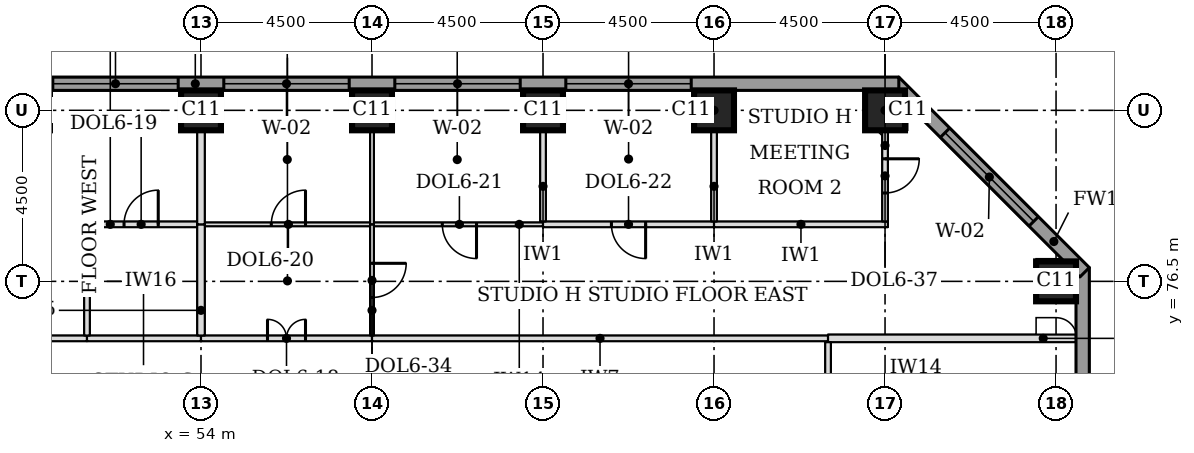
"""IFC4 building model, lengths in metres.
Left out: names, types, materials, properties, quantities, classifications, styles, units other than length and angle.
Written with IfcOpenShell. Run it as: python <this file> out.ifc"""

import sys

from ifc_helpers import new_model, si_unit, direction, frame, frame_2d, origin, origin_2d, place, context, subcontext, project, spatial, rectangle, extrude, element, fill, save


model = new_model("IFC4")
c1 = context("Model", 3, precision=1e-05, world=origin(), true_north=direction((0.0, 1.0)))
c2 = subcontext(c1, "Body", "Model", "MODEL_VIEW")
j1 = project(units=[si_unit("LENGTHUNIT", "METRE"), si_unit("PLANEANGLEUNIT", "RADIAN")], contexts=[c1])
p1 = place(None, origin())
s1 = spatial("IfcSite", under=j1, at=p1, CompositionType="ELEMENT")
p2 = place(p1, origin())
s2 = spatial("IfcBuilding", under=s1, at=p2, CompositionType="ELEMENT")
p3 = place(p2, frame((0.0, 0.0, 115.9)))
s3 = spatial("IfcBuildingStorey", under=s2, at=p3, CompositionType="ELEMENT", Elevation=115.9)
for number, where, z_axis, x_axis in (
    (1, (76.5, 76.5, 0.0), (0.0, 0.0, 1.0), (1.0, 0.0, 0.0)),
    (2, (54.0, 81.0, 0.0), (0.0, 0.0, 1.0), (1.0, 0.0, 0.0)),
    (3, (58.5, 81.0, 0.0), (0.0, 0.0, 1.0), (1.0, 0.0, 0.0)),
    (4, (63.0, 81.0, 0.0), (0.0, 0.0, 1.0), (1.0, 0.0, 0.0)),
    (5, (67.5, 81.0, 0.0), (0.0, 0.0, 1.0), (1.0, 0.0, 0.0)),
    (6, (72.0, 81.0, 0.0), (0.0, 0.0, 1.0), (1.0, 0.0, 0.0)),
):
    element("IfcColumn", number, at=place(p3, frame(where, z_axis=z_axis, x_axis=x_axis)), inside=s3, PredefinedType="COLUMN", context=c2, shape_type="SweptSolid", body=[
        extrude(rectangle(XDim=1.05, YDim=1.05, at=origin_2d()), origin(), (0.0, 0.0, 1.0), 3.7),
    ])
p4 = place(p3, frame((77.2, 44.638, 0.0), z_axis=(0.0, 0.0, 1.0), x_axis=(0.0, 1.0, 0.0)))
e7 = element("IfcWall", 7, at=p4, inside=s3, PredefinedType="STANDARD", context=c2, shape_type="SweptSolid", body=[
    extrude(rectangle(XDim=32.225, YDim=0.35, at=frame_2d((16.112, 0.0))), origin(), (0.0, 0.0, 1.0), 3.525),
])
p5 = place(p4, frame((5.462, 0.0, 0.9)))
e8 = element("IfcOpeningElement", 8, at=p5, cuts=e7, PredefinedType="OPENING", context=c2, shape_type="SweptSolid", body=[
    extrude(rectangle(XDim=3.3, YDim=1.9, at=frame_2d((1.65, 0.95))), frame((0.0, 0.185, 0.0), z_axis=(0.0, -1.0, 0.0), x_axis=(1.0, 0.0, 0.0)), (0.0, 0.0, 1.0), 0.37),
])
p6 = place(p4, frame((9.962, 0.0, 0.9)))
e9 = element("IfcOpeningElement", 9, at=p6, cuts=e7, PredefinedType="OPENING", context=c2, shape_type="SweptSolid", body=[
    extrude(rectangle(XDim=3.3, YDim=1.9, at=frame_2d((1.65, 0.95))), frame((0.0, 0.185, 0.0), z_axis=(0.0, -1.0, 0.0), x_axis=(1.0, 0.0, 0.0)), (0.0, 0.0, 1.0), 0.37),
])
p7 = place(p4, frame((14.462, 0.0, 0.9)))
e10 = element("IfcOpeningElement", 10, at=p7, cuts=e7, PredefinedType="OPENING", context=c2, shape_type="SweptSolid", body=[
    extrude(rectangle(XDim=3.3, YDim=1.9, at=frame_2d((1.65, 0.95))), frame((0.0, 0.185, 0.0), z_axis=(0.0, -1.0, 0.0), x_axis=(1.0, 0.0, 0.0)), (0.0, 0.0, 1.0), 0.37),
])
p8 = place(p4, frame((18.962, 0.0, 0.9)))
e11 = element("IfcOpeningElement", 11, at=p8, cuts=e7, PredefinedType="OPENING", context=c2, shape_type="SweptSolid", body=[
    extrude(rectangle(XDim=3.3, YDim=1.9, at=frame_2d((1.65, 0.95))), frame((0.0, 0.185, 0.0), z_axis=(0.0, -1.0, 0.0), x_axis=(1.0, 0.0, 0.0)), (0.0, 0.0, 1.0), 0.37),
])
p9 = place(p4, frame((23.462, 0.0, 0.9)))
e12 = element("IfcOpeningElement", 12, at=p9, cuts=e7, PredefinedType="OPENING", context=c2, shape_type="SweptSolid", body=[
    extrude(rectangle(XDim=3.3, YDim=1.9, at=frame_2d((1.65, 0.95))), frame((0.0, 0.185, 0.0), z_axis=(0.0, -1.0, 0.0), x_axis=(1.0, 0.0, 0.0)), (0.0, 0.0, 1.0), 0.37),
])
p10 = place(p3, frame((77.251, 76.739, 0.0), z_axis=(0.0, 0.0, 1.0), x_axis=(-0.707106781187, 0.707106781187, 0.0)))
e13 = element("IfcWall", 13, at=p10, inside=s3, PredefinedType="STANDARD", context=c2, shape_type="SweptSolid", body=[
    extrude(rectangle(XDim=7.089, YDim=0.35, at=frame_2d((3.544, 0.0))), origin(), (0.0, 0.0, 1.0), 3.525),
])
p11 = place(p10, frame((1.894, 0.0, 0.9)))
e14 = element("IfcOpeningElement", 14, at=p11, cuts=e13, PredefinedType="OPENING", context=c2, shape_type="SweptSolid", body=[
    extrude(rectangle(XDim=3.3, YDim=1.9, at=frame_2d((1.65, 0.95))), frame((0.0, 0.185, 0.0), z_axis=(0.0, -1.0, 0.0), x_axis=(1.0, 0.0, 0.0)), (0.0, 0.0, 1.0), 0.37),
])
p12 = place(p3, frame((72.362, 81.7, 0.0), z_axis=(0.0, 0.0, 1.0), x_axis=(-1.0, 0.0, 0.0)))
e15 = element("IfcWall", 15, at=p12, inside=s3, PredefinedType="STANDARD", context=c2, shape_type="SweptSolid", body=[
    extrude(rectangle(XDim=32.225, YDim=0.35, at=frame_2d((16.112, 0.0))), origin(), (0.0, 0.0, 1.0), 3.525),
])
p13 = place(p12, frame((5.462, 0.0, 0.9)))
e16 = element("IfcOpeningElement", 16, at=p13, cuts=e15, PredefinedType="OPENING", context=c2, shape_type="SweptSolid", body=[
    extrude(rectangle(XDim=3.3, YDim=1.9, at=frame_2d((1.65, 0.95))), frame((0.0, 0.185, 0.0), z_axis=(0.0, -1.0, 0.0), x_axis=(1.0, 0.0, 0.0)), (0.0, 0.0, 1.0), 0.37),
])
p14 = place(p12, frame((9.962, 0.0, 0.9)))
e17 = element("IfcOpeningElement", 17, at=p14, cuts=e15, PredefinedType="OPENING", context=c2, shape_type="SweptSolid", body=[
    extrude(rectangle(XDim=3.3, YDim=1.9, at=frame_2d((1.65, 0.95))), frame((0.0, 0.185, 0.0), z_axis=(0.0, -1.0, 0.0), x_axis=(1.0, 0.0, 0.0)), (0.0, 0.0, 1.0), 0.37),
])
p15 = place(p12, frame((14.462, 0.0, 0.9)))
e18 = element("IfcOpeningElement", 18, at=p15, cuts=e15, PredefinedType="OPENING", context=c2, shape_type="SweptSolid", body=[
    extrude(rectangle(XDim=3.3, YDim=1.9, at=frame_2d((1.65, 0.95))), frame((0.0, 0.185, 0.0), z_axis=(0.0, -1.0, 0.0), x_axis=(1.0, 0.0, 0.0)), (0.0, 0.0, 1.0), 0.37),
])
p16 = place(p12, frame((18.962, 0.0, 0.9)))
e19 = element("IfcOpeningElement", 19, at=p16, cuts=e15, PredefinedType="OPENING", context=c2, shape_type="SweptSolid", body=[
    extrude(rectangle(XDim=3.3, YDim=1.9, at=frame_2d((1.65, 0.95))), frame((0.0, 0.185, 0.0), z_axis=(0.0, -1.0, 0.0), x_axis=(1.0, 0.0, 0.0)), (0.0, 0.0, 1.0), 0.37),
])
p17 = place(p12, frame((23.462, 0.0, 0.9)))
e20 = element("IfcOpeningElement", 20, at=p17, cuts=e15, PredefinedType="OPENING", context=c2, shape_type="SweptSolid", body=[
    extrude(rectangle(XDim=3.3, YDim=1.9, at=frame_2d((1.65, 0.95))), frame((0.0, 0.185, 0.0), z_axis=(0.0, -1.0, 0.0), x_axis=(1.0, 0.0, 0.0)), (0.0, 0.0, 1.0), 0.37),
])
p18 = place(p3, frame((46.5, 75.0, 0.0), z_axis=(0.0, 0.0, 1.0), x_axis=(1.0, 0.0, 0.0)))
e21 = element("IfcWall", 21, at=p18, inside=s3, PredefinedType="PARTITIONING", context=c2, shape_type="SweptSolid", body=[
    extrude(rectangle(XDim=4.5, YDim=0.15, at=frame_2d((2.25, 0.0))), origin(), (0.0, 0.0, 1.0), 3.55),
])
p19 = place(p3, frame((51.0, 75.0, 0.0), z_axis=(0.0, 0.0, 1.0), x_axis=(1.0, 0.0, 0.0)))
e22 = element("IfcWall", 22, at=p19, inside=s3, PredefinedType="PARTITIONING", context=c2, shape_type="SweptSolid", body=[
    extrude(rectangle(XDim=3.0, YDim=0.15, at=frame_2d((1.5, 0.0))), origin(), (0.0, 0.0, 1.0), 3.55),
])
p20 = place(p3, frame((54.0, 75.0, 0.0), z_axis=(0.0, 0.0, 1.0), x_axis=(1.0, 0.0, 0.0)))
e23 = element("IfcWall", 23, at=p20, inside=s3, PredefinedType="PARTITIONING", context=c2, shape_type="SweptSolid", body=[
    extrude(rectangle(XDim=4.5, YDim=0.15, at=frame_2d((2.25, 0.0))), origin(), (0.0, 0.0, 1.0), 3.55),
])
p21 = place(p20, frame((1.75, 0.0, 0.0)))
e24 = element("IfcOpeningElement", 24, at=p21, cuts=e23, PredefinedType="OPENING", context=c2, shape_type="SweptSolid", body=[
    extrude(rectangle(XDim=1.0, YDim=2.1, at=frame_2d((0.5, 1.05))), frame((0.0, 0.085, 0.0), z_axis=(0.0, -1.0, 0.0), x_axis=(1.0, 0.0, 0.0)), (0.0, 0.0, 1.0), 0.17),
])
p22 = place(p3, frame((58.5, 75.0, 0.0), z_axis=(0.0, 0.0, 1.0), x_axis=(1.0, 0.0, 0.0)))
e25 = element("IfcWall", 25, at=p22, inside=s3, PredefinedType="PARTITIONING", context=c2, shape_type="SweptSolid", body=[
    extrude(rectangle(XDim=12.0, YDim=0.15, at=frame_2d((6.0, 0.0))), origin(), (0.0, 0.0, 1.0), 3.55),
])
p23 = place(p3, frame((70.5, 75.0, 0.0), z_axis=(0.0, 0.0, 1.0), x_axis=(1.0, 0.0, 0.0)))
e26 = element("IfcWall", 26, at=p23, inside=s3, PredefinedType="PARTITIONING", context=c2, shape_type="SweptSolid", body=[
    extrude(rectangle(XDim=6.525, YDim=0.2, at=frame_2d((3.262, 0.0))), origin(), (0.0, 0.0, 1.0), 3.55),
])
p24 = place(p3, frame((50.925, 78.0, 0.0), z_axis=(0.0, 0.0, 1.0), x_axis=(1.0, 0.0, 0.0)))
e27 = element("IfcWall", 27, at=p24, inside=s3, PredefinedType="PARTITIONING", context=c2, shape_type="SweptSolid", body=[
    extrude(rectangle(XDim=2.975, YDim=0.15, at=frame_2d((1.487, 0.0))), origin(), (0.0, 0.0, 1.0), 3.55),
])
p25 = place(p24, frame((1.05, 0.0, 0.0)))
e28 = element("IfcOpeningElement", 28, at=p25, cuts=e27, PredefinedType="OPENING", context=c2, shape_type="SweptSolid", body=[
    extrude(rectangle(XDim=0.9, YDim=2.1, at=frame_2d((0.45, 1.05))), frame((0.0, 0.085, 0.0), z_axis=(0.0, -1.0, 0.0), x_axis=(1.0, 0.0, 0.0)), (0.0, 0.0, 1.0), 0.17),
])
p26 = place(p3, frame((54.1, 78.0, 0.0), z_axis=(0.0, 0.0, 1.0), x_axis=(1.0, 0.0, 0.0)))
e29 = element("IfcWall", 29, at=p26, inside=s3, PredefinedType="PARTITIONING", context=c2, shape_type="SweptSolid", body=[
    extrude(rectangle(XDim=4.35, YDim=0.1, at=frame_2d((2.175, 0.0))), origin(), (0.0, 0.0, 1.0), 3.55),
])
p27 = place(p26, frame((1.75, 0.0, 0.0)))
e30 = element("IfcOpeningElement", 30, at=p27, cuts=e29, PredefinedType="OPENING", context=c2, shape_type="SweptSolid", body=[
    extrude(rectangle(XDim=0.9, YDim=2.1, at=frame_2d((0.45, 1.05))), frame((0.0, 0.06, 0.0), z_axis=(0.0, -1.0, 0.0), x_axis=(1.0, 0.0, 0.0)), (0.0, 0.0, 1.0), 0.12),
])
p28 = place(p3, frame((58.55, 78.0, 0.0), z_axis=(0.0, 0.0, 1.0), x_axis=(1.0, 0.0, 0.0)))
e31 = element("IfcWall", 31, at=p28, inside=s3, PredefinedType="PARTITIONING", context=c2, shape_type="SweptSolid", body=[
    extrude(rectangle(XDim=4.45, YDim=0.1, at=frame_2d((2.225, 0.0))), origin(), (0.0, 0.0, 1.0), 3.55),
])
p29 = place(p28, frame((1.8, 0.0, 0.0)))
e32 = element("IfcOpeningElement", 32, at=p29, cuts=e31, PredefinedType="OPENING", context=c2, shape_type="SweptSolid", body=[
    extrude(rectangle(XDim=0.9, YDim=2.1, at=frame_2d((0.45, 1.05))), frame((0.0, 0.06, 0.0), z_axis=(0.0, -1.0, 0.0), x_axis=(1.0, 0.0, 0.0)), (0.0, 0.0, 1.0), 0.12),
])
p30 = place(p3, frame((63.0, 78.0, 0.0), z_axis=(0.0, 0.0, 1.0), x_axis=(1.0, 0.0, 0.0)))
e33 = element("IfcWall", 33, at=p30, inside=s3, PredefinedType="PARTITIONING", context=c2, shape_type="SweptSolid", body=[
    extrude(rectangle(XDim=4.5, YDim=0.15, at=frame_2d((2.25, 0.0))), origin(), (0.0, 0.0, 1.0), 3.55),
])
p31 = place(p30, frame((1.8, 0.0, 0.0)))
e34 = element("IfcOpeningElement", 34, at=p31, cuts=e33, PredefinedType="OPENING", context=c2, shape_type="SweptSolid", body=[
    extrude(rectangle(XDim=0.9, YDim=2.1, at=frame_2d((0.45, 1.05))), frame((0.0, 0.085, 0.0), z_axis=(0.0, -1.0, 0.0), x_axis=(1.0, 0.0, 0.0)), (0.0, 0.0, 1.0), 0.17),
])
p32 = place(p3, frame((67.5, 78.0, 0.0), z_axis=(0.0, 0.0, 1.0), x_axis=(1.0, 0.0, 0.0)))
e35 = element("IfcWall", 35, at=p32, inside=s3, PredefinedType="PARTITIONING", context=c2, shape_type="SweptSolid", body=[
    extrude(rectangle(XDim=4.575, YDim=0.15, at=frame_2d((2.288, 0.0))), origin(), (0.0, 0.0, 1.0), 3.55),
])
p33 = place(p3, frame((70.5, 64.5, 0.0), z_axis=(0.0, 0.0, 1.0), x_axis=(0.0, 1.0, 0.0)))
e36 = element("IfcWall", 36, at=p33, inside=s3, PredefinedType="PARTITIONING", context=c2, shape_type="SweptSolid", body=[
    extrude(rectangle(XDim=10.4, YDim=0.15, at=frame_2d((5.2, 0.0))), origin(), (0.0, 0.0, 1.0), 3.55),
])
p34 = place(p3, frame((51.0, 75.075, 0.0), z_axis=(0.0, 0.0, 1.0), x_axis=(0.0, 1.0, 0.0)))
e37 = element("IfcWall", 37, at=p34, inside=s3, PredefinedType="PARTITIONING", context=c2, shape_type="SweptSolid", body=[
    extrude(rectangle(XDim=2.85, YDim=0.15, at=frame_2d((1.425, 0.0))), origin(), (0.0, 0.0, 1.0), 3.55),
])
p35 = place(p3, frame((54.0, 75.075, 0.0), z_axis=(0.0, 0.0, 1.0), x_axis=(0.0, 1.0, 0.0)))
e38 = element("IfcWall", 38, at=p35, inside=s3, PredefinedType="PARTITIONING", context=c2, shape_type="SweptSolid", body=[
    extrude(rectangle(XDim=2.925, YDim=0.2, at=frame_2d((1.462, 0.0))), origin(), (0.0, 0.0, 1.0), 3.55),
])
p36 = place(p3, frame((58.5, 75.075, 0.0), z_axis=(0.0, 0.0, 1.0), x_axis=(0.0, 1.0, 0.0)))
e39 = element("IfcWall", 39, at=p36, inside=s3, PredefinedType="PARTITIONING", context=c2, shape_type="SweptSolid", body=[
    extrude(rectangle(XDim=2.925, YDim=0.1, at=frame_2d((1.462, 0.0))), origin(), (0.0, 0.0, 1.0), 3.55),
])
p37 = place(p36, frame((1.0, 0.0, 0.0)))
e40 = element("IfcOpeningElement", 40, at=p37, cuts=e39, PredefinedType="OPENING", context=c2, shape_type="SweptSolid", body=[
    extrude(rectangle(XDim=0.9, YDim=2.1, at=frame_2d((0.45, 1.05))), frame((0.0, 0.06, 0.0), z_axis=(0.0, -1.0, 0.0), x_axis=(1.0, 0.0, 0.0)), (0.0, 0.0, 1.0), 0.12),
])
p38 = place(p3, frame((54.0, 78.0, 0.0), z_axis=(0.0, 0.0, 1.0), x_axis=(0.0, 1.0, 0.0)))
e41 = element("IfcWall", 41, at=p38, inside=s3, PredefinedType="PARTITIONING", context=c2, shape_type="SweptSolid", body=[
    extrude(rectangle(XDim=3.525, YDim=0.2, at=frame_2d((1.762, 0.0))), origin(), (0.0, 0.0, 1.0), 3.55),
])
p39 = place(p3, frame((58.5, 78.0, 0.0), z_axis=(0.0, 0.0, 1.0), x_axis=(0.0, 1.0, 0.0)))
e42 = element("IfcWall", 42, at=p39, inside=s3, PredefinedType="PARTITIONING", context=c2, shape_type="SweptSolid", body=[
    extrude(rectangle(XDim=3.525, YDim=0.1, at=frame_2d((1.762, 0.0))), origin(), (0.0, 0.0, 1.0), 3.55),
])
for number, where, z_axis, x_axis in (
    (43, (63.0, 78.075, 0.0), (0.0, 0.0, 1.0), (0.0, 1.0, 0.0)),
    (44, (67.5, 78.075, 0.0), (0.0, 0.0, 1.0), (0.0, 1.0, 0.0)),
):
    element("IfcWall", number, at=place(p3, frame(where, z_axis=z_axis, x_axis=x_axis)), inside=s3, PredefinedType="PARTITIONING", context=c2, shape_type="SweptSolid", body=[
        extrude(rectangle(XDim=3.45, YDim=0.15, at=frame_2d((1.725, 0.0))), origin(), (0.0, 0.0, 1.0), 3.55),
    ])
p40 = place(p3, frame((72.0, 78.075, 0.0), z_axis=(0.0, 0.0, 1.0), x_axis=(0.0, 1.0, 0.0)))
e45 = element("IfcWall", 45, at=p40, inside=s3, PredefinedType="PARTITIONING", context=c2, shape_type="SweptSolid", body=[
    extrude(rectangle(XDim=2.4, YDim=0.15, at=frame_2d((1.2, 0.0))), origin(), (0.0, 0.0, 1.0), 3.55),
])
p41 = place(p40, frame((0.75, 0.0, 0.0)))
e46 = element("IfcOpeningElement", 46, at=p41, cuts=e45, PredefinedType="OPENING", context=c2, shape_type="SweptSolid", body=[
    extrude(rectangle(XDim=0.9, YDim=2.1, at=frame_2d((0.45, 1.05))), frame((0.0, 0.085, 0.0), z_axis=(0.0, -1.0, 0.0), x_axis=(1.0, 0.0, 0.0)), (0.0, 0.0, 1.0), 0.17),
])
p42 = place(p11, origin())
e47 = element("IfcWindow", 47, at=p42, inside=s3, PartitioningType="SINGLE_PANEL", PredefinedType="WINDOW", context=c2, shape_type="SweptSolid", body=[
    extrude(rectangle(XDim=3.3, YDim=1.9, at=frame_2d((1.65, 0.95))), frame((0.0, 0.085, 0.0), z_axis=(0.0, -1.0, 0.0), x_axis=(1.0, 0.0, 0.0)), (0.0, 0.0, 1.0), 0.06),
])
fill(e14, e47)
p43 = place(p13, origin())
e48 = element("IfcWindow", 48, at=p43, inside=s3, PartitioningType="SINGLE_PANEL", PredefinedType="WINDOW", context=c2, shape_type="SweptSolid", body=[
    extrude(rectangle(XDim=3.3, YDim=1.9, at=frame_2d((1.65, 0.95))), frame((0.0, 0.085, 0.0), z_axis=(0.0, -1.0, 0.0), x_axis=(1.0, 0.0, 0.0)), (0.0, 0.0, 1.0), 0.06),
])
fill(e16, e48)
p44 = place(p14, origin())
e49 = element("IfcWindow", 49, at=p44, inside=s3, PartitioningType="SINGLE_PANEL", PredefinedType="WINDOW", context=c2, shape_type="SweptSolid", body=[
    extrude(rectangle(XDim=3.3, YDim=1.9, at=frame_2d((1.65, 0.95))), frame((0.0, 0.085, 0.0), z_axis=(0.0, -1.0, 0.0), x_axis=(1.0, 0.0, 0.0)), (0.0, 0.0, 1.0), 0.06),
])
fill(e17, e49)
p45 = place(p15, origin())
e50 = element("IfcWindow", 50, at=p45, inside=s3, PartitioningType="SINGLE_PANEL", PredefinedType="WINDOW", context=c2, shape_type="SweptSolid", body=[
    extrude(rectangle(XDim=3.3, YDim=1.9, at=frame_2d((1.65, 0.95))), frame((0.0, 0.085, 0.0), z_axis=(0.0, -1.0, 0.0), x_axis=(1.0, 0.0, 0.0)), (0.0, 0.0, 1.0), 0.06),
])
fill(e18, e50)
p46 = place(p16, origin())
e51 = element("IfcWindow", 51, at=p46, inside=s3, PartitioningType="SINGLE_PANEL", PredefinedType="WINDOW", context=c2, shape_type="SweptSolid", body=[
    extrude(rectangle(XDim=3.3, YDim=1.9, at=frame_2d((1.65, 0.95))), frame((0.0, 0.085, 0.0), z_axis=(0.0, -1.0, 0.0), x_axis=(1.0, 0.0, 0.0)), (0.0, 0.0, 1.0), 0.06),
])
fill(e19, e51)
p47 = place(p25, origin())
e52 = element("IfcDoor", 52, at=p47, inside=s3, OperationType="SINGLE_SWING_RIGHT", PredefinedType="DOOR", context=c2, shape_type="SweptSolid", body=[
    extrude(rectangle(XDim=0.9, YDim=2.1, at=frame_2d((0.45, 1.05))), frame((0.0, 0.025, 0.0), z_axis=(0.0, -1.0, 0.0), x_axis=(1.0, 0.0, 0.0)), (0.0, 0.0, 1.0), 0.05),
])
fill(e28, e52)
p48 = place(p21, origin())
e53 = element("IfcDoor", 53, at=p48, inside=s3, OperationType="DOUBLE_DOOR_SINGLE_SWING", PredefinedType="DOOR", context=c2, shape_type="SweptSolid", body=[
    extrude(rectangle(XDim=1.0, YDim=2.1, at=frame_2d((0.5, 1.05))), frame((0.0, 0.025, 0.0), z_axis=(0.0, -1.0, 0.0), x_axis=(1.0, 0.0, 0.0)), (0.0, 0.0, 1.0), 0.05),
])
fill(e24, e53)
p49 = place(p37, frame((0.9, 0.0, 0.0), z_axis=(0.0, 0.0, 1.0), x_axis=(-1.0, 0.0, 0.0)))
e54 = element("IfcDoor", 54, at=p49, inside=s3, OperationType="SINGLE_SWING_LEFT", PredefinedType="DOOR", context=c2, shape_type="SweptSolid", body=[
    extrude(rectangle(XDim=0.9, YDim=2.1, at=frame_2d((0.45, 1.05))), frame((0.0, 0.025, 0.0), z_axis=(0.0, -1.0, 0.0), x_axis=(1.0, 0.0, 0.0)), (0.0, 0.0, 1.0), 0.05),
])
fill(e40, e54)
p50 = place(p27, origin())
e55 = element("IfcDoor", 55, at=p50, inside=s3, OperationType="SINGLE_SWING_RIGHT", PredefinedType="DOOR", context=c2, shape_type="SweptSolid", body=[
    extrude(rectangle(XDim=0.9, YDim=2.1, at=frame_2d((0.45, 1.05))), frame((0.0, 0.025, 0.0), z_axis=(0.0, -1.0, 0.0), x_axis=(1.0, 0.0, 0.0)), (0.0, 0.0, 1.0), 0.05),
])
fill(e30, e55)
p51 = place(p29, frame((0.9, 0.0, 0.0), z_axis=(0.0, 0.0, 1.0), x_axis=(-1.0, 0.0, 0.0)))
e56 = element("IfcDoor", 56, at=p51, inside=s3, OperationType="SINGLE_SWING_LEFT", PredefinedType="DOOR", context=c2, shape_type="SweptSolid", body=[
    extrude(rectangle(XDim=0.9, YDim=2.1, at=frame_2d((0.45, 1.05))), frame((0.0, 0.025, 0.0), z_axis=(0.0, -1.0, 0.0), x_axis=(1.0, 0.0, 0.0)), (0.0, 0.0, 1.0), 0.05),
])
fill(e32, e56)
p52 = place(p31, frame((0.9, 0.0, 0.0), z_axis=(0.0, 0.0, 1.0), x_axis=(-1.0, 0.0, 0.0)))
e57 = element("IfcDoor", 57, at=p52, inside=s3, OperationType="SINGLE_SWING_LEFT", PredefinedType="DOOR", context=c2, shape_type="SweptSolid", body=[
    extrude(rectangle(XDim=0.9, YDim=2.1, at=frame_2d((0.45, 1.05))), frame((0.0, 0.025, 0.0), z_axis=(0.0, -1.0, 0.0), x_axis=(1.0, 0.0, 0.0)), (0.0, 0.0, 1.0), 0.05),
])
fill(e34, e57)
p53 = place(p41, frame((0.9, 0.0, 0.0), z_axis=(0.0, 0.0, 1.0), x_axis=(-1.0, 0.0, 0.0)))
e58 = element("IfcDoor", 58, at=p53, inside=s3, OperationType="SINGLE_SWING_LEFT", PredefinedType="DOOR", context=c2, shape_type="SweptSolid", body=[
    extrude(rectangle(XDim=0.9, YDim=2.1, at=frame_2d((0.45, 1.05))), frame((0.0, 0.025, 0.0), z_axis=(0.0, -1.0, 0.0), x_axis=(1.0, 0.0, 0.0)), (0.0, 0.0, 1.0), 0.05),
])
fill(e46, e58)
save(model, sys.argv[1])
